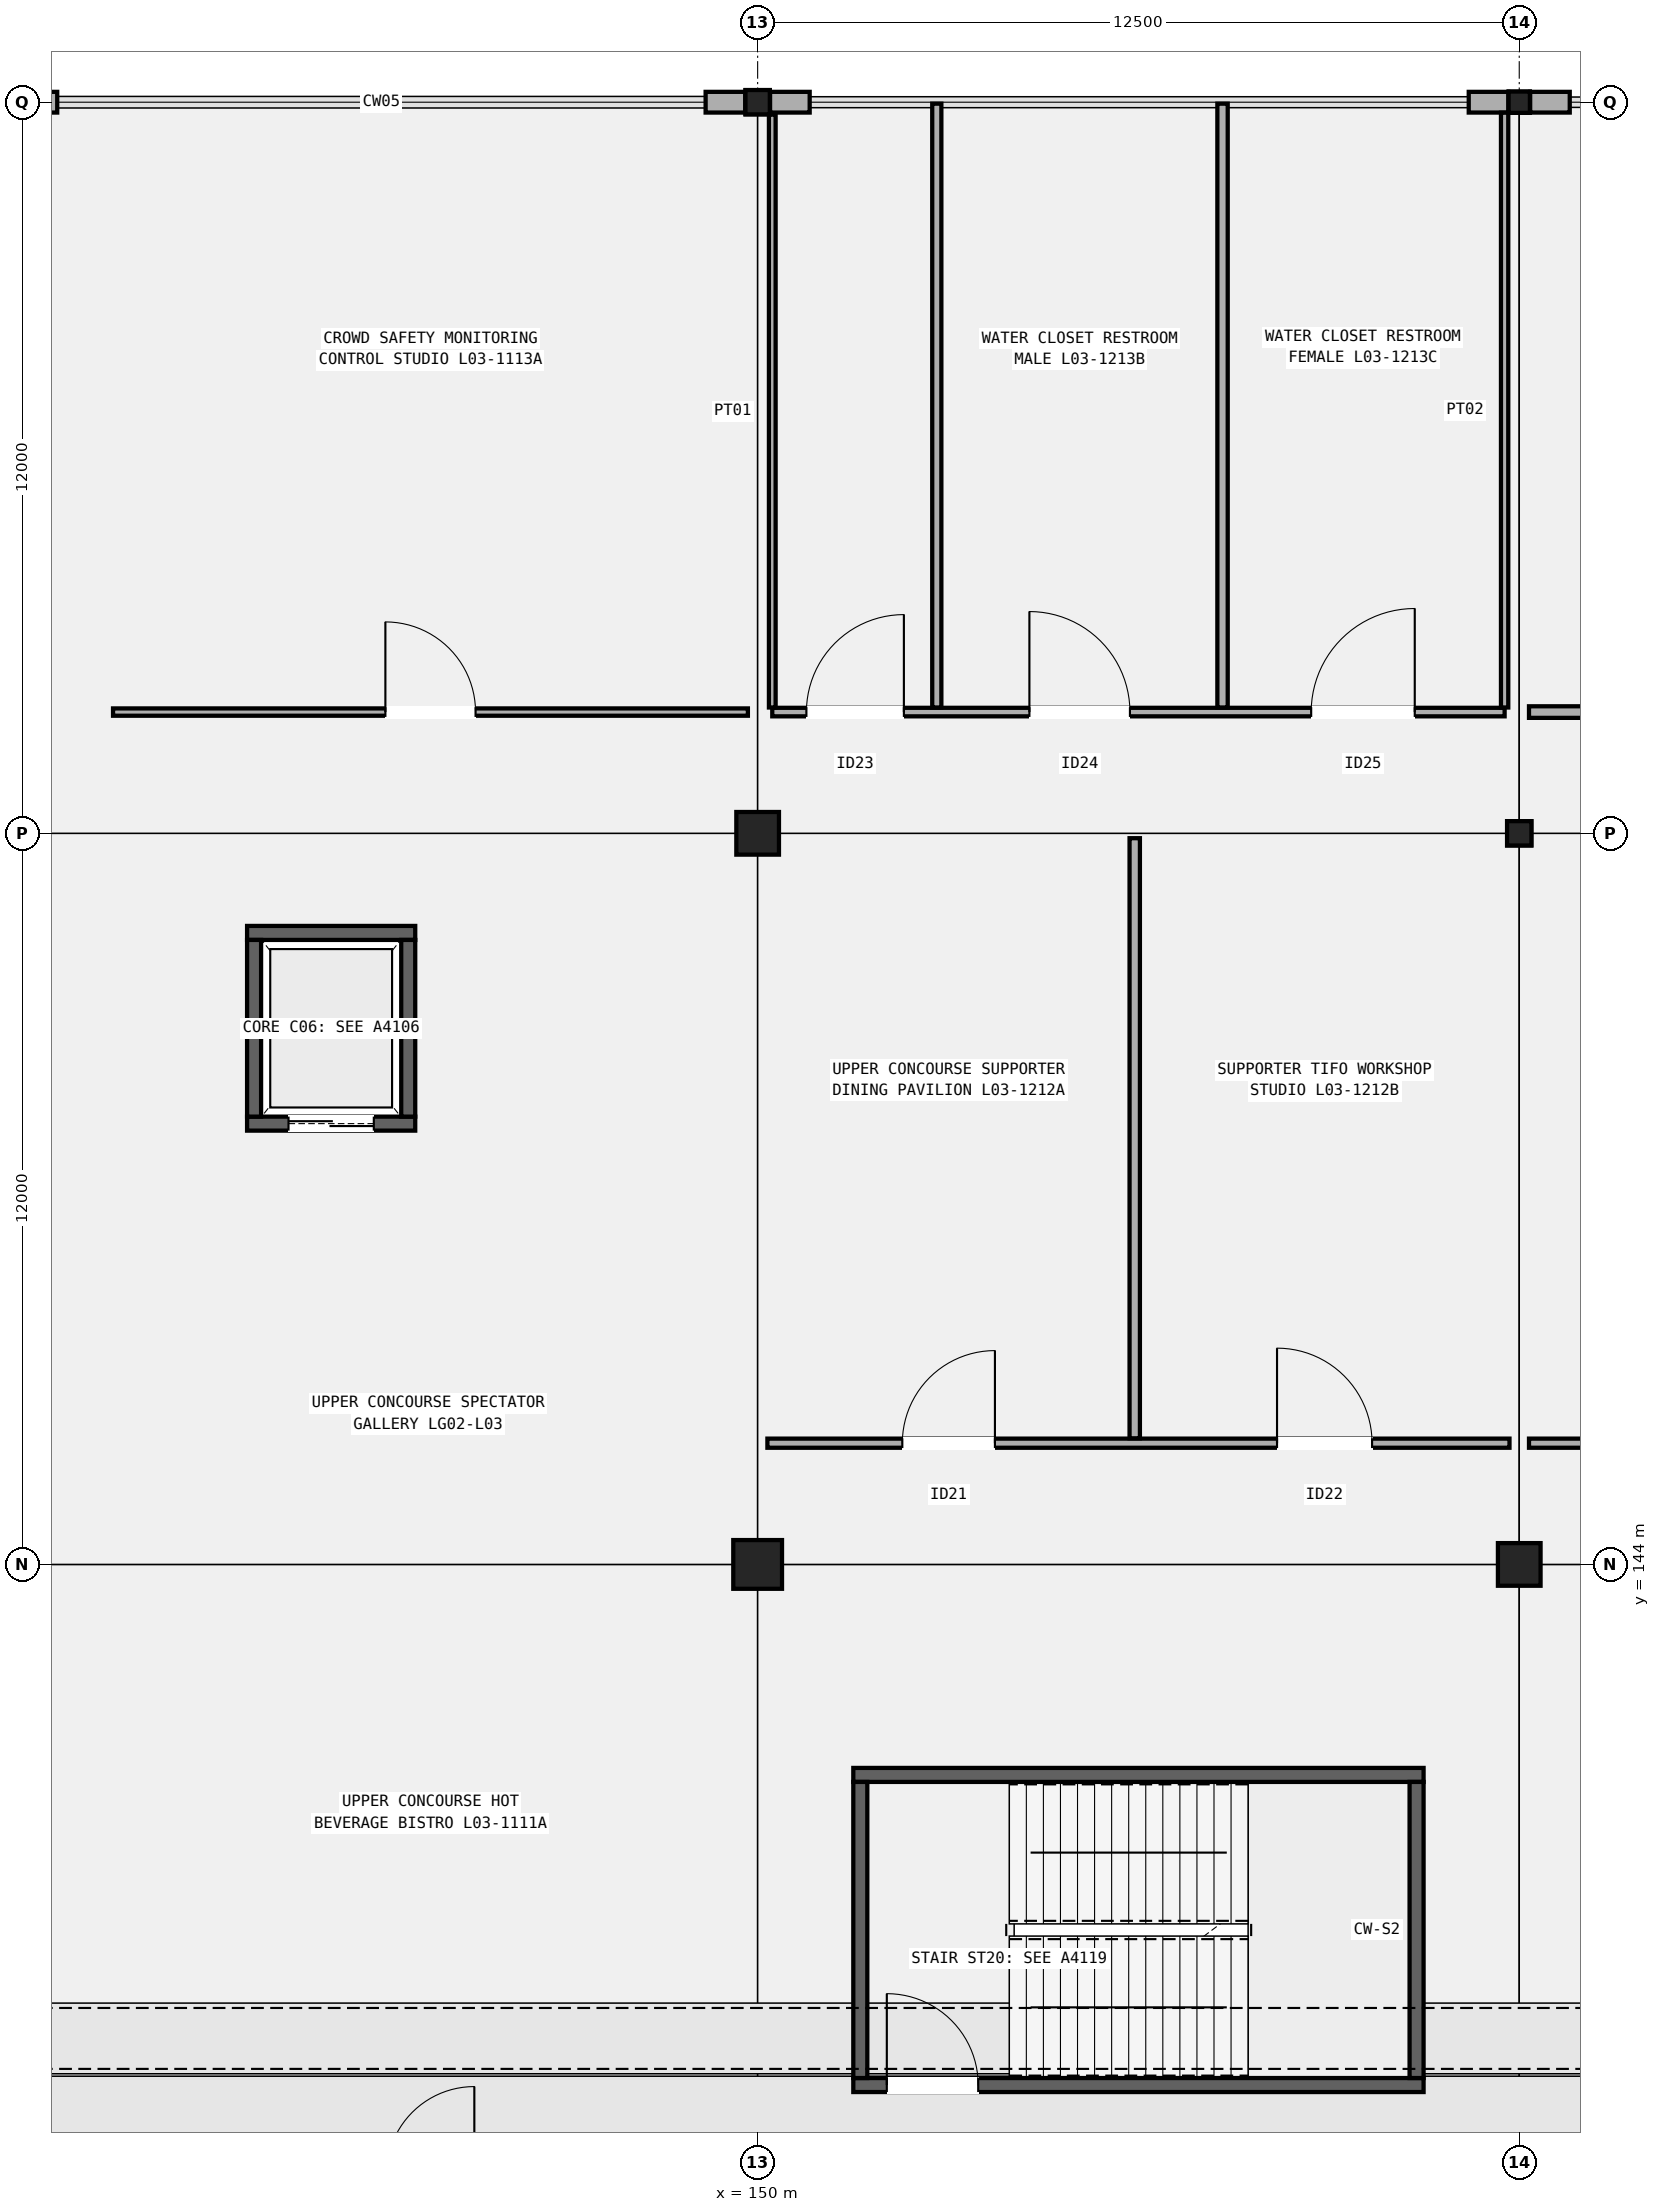
"""IFC4 building model, lengths in metres.
Left out: names, types, materials, properties, quantities, classifications, styles, units other than length and angle.
Written with IfcOpenShell. Run it as: python <this file> out.ifc"""

import sys

from ifc_helpers import new_model, si_unit, direction, frame, frame_2d, origin, origin_2d, place, context, subcontext, project, spatial, rectangle, hollow_rectangle, extrude, element, fill, save


model = new_model("IFC4")
c1 = context("Model", 3, precision=1e-05, world=origin(), true_north=direction((0.0, 1.0)))
c2 = subcontext(c1, "Body", "Model", "MODEL_VIEW")
j1 = project(units=[si_unit("LENGTHUNIT", "METRE"), si_unit("PLANEANGLEUNIT", "RADIAN")], contexts=[c1])
p1 = place(None, origin())
s1 = spatial("IfcSite", under=j1, at=p1, CompositionType="ELEMENT")
p2 = place(p1, origin())
s2 = spatial("IfcBuilding", under=s1, at=p2, CompositionType="ELEMENT")
p3 = place(p2, frame((0.0, 0.0, 15.3)))
s3 = spatial("IfcBuildingStorey", under=s2, at=p3, CompositionType="ELEMENT", Elevation=15.3)
p4 = place(p3, frame((150.0, 144.0, 0.0), z_axis=(0.0, 0.0, 1.0), x_axis=(1.0, 0.0, 0.0)))
e1 = element("IfcColumn", 1, at=p4, inside=s3, PredefinedType="COLUMN", context=c2, shape_type="SweptSolid", body=[
    extrude(rectangle(XDim=0.8, YDim=0.8, at=origin_2d()), origin(), (0.0, 0.0, 1.0), 5.1),
])
p5 = place(p3, frame((150.0, 156.0, 0.0), z_axis=(0.0, 0.0, 1.0), x_axis=(1.0, 0.0, 0.0)))
e2 = element("IfcColumn", 2, at=p5, inside=s3, PredefinedType="COLUMN", context=c2, shape_type="SweptSolid", body=[
    extrude(rectangle(XDim=0.7, YDim=0.7, at=origin_2d()), origin(), (0.0, 0.0, 1.0), 5.1),
])
p6 = place(p3, frame((150.0, 168.0, 0.0), z_axis=(0.0, 0.0, 1.0), x_axis=(1.0, 0.0, 0.0)))
e3 = element("IfcColumn", 3, at=p6, inside=s3, PredefinedType="COLUMN", context=c2, shape_type="SweptSolid", body=[
    extrude(hollow_rectangle(XDim=0.4, YDim=0.4, WallThickness=0.016, InnerFilletRadius=0.016, OuterFilletRadius=0.032, at=origin_2d()), origin(), (0.0, 0.0, 1.0), 5.1),
])
p7 = place(p3, frame((162.5, 144.0, 0.0), z_axis=(0.0, 0.0, 1.0), x_axis=(1.0, 0.0, 0.0)))
e4 = element("IfcColumn", 4, at=p7, inside=s3, PredefinedType="COLUMN", context=c2, shape_type="SweptSolid", body=[
    extrude(rectangle(XDim=0.7, YDim=0.7, at=origin_2d()), origin(), (0.0, 0.0, 1.0), 5.1),
])
p8 = place(p3, frame((162.5, 156.0, 0.0), z_axis=(0.0, 0.0, 1.0), x_axis=(1.0, 0.0, 0.0)))
e5 = element("IfcColumn", 5, at=p8, inside=s3, PredefinedType="COLUMN", context=c2, shape_type="SweptSolid", body=[
    extrude(hollow_rectangle(XDim=0.4, YDim=0.4, WallThickness=0.016, InnerFilletRadius=0.016, OuterFilletRadius=0.032, at=origin_2d()), origin(), (0.0, 0.0, 1.0), 5.1),
])
p9 = place(p3, frame((162.5, 168.0, 0.0), z_axis=(0.0, 0.0, 1.0), x_axis=(1.0, 0.0, 0.0)))
e6 = element("IfcColumn", 6, at=p9, inside=s3, PredefinedType="COLUMN", context=c2, shape_type="SweptSolid", body=[
    extrude(hollow_rectangle(XDim=0.35, YDim=0.35, WallThickness=0.016, InnerFilletRadius=0.016, OuterFilletRadius=0.032, at=origin_2d()), origin(), (0.0, 0.0, 1.0), 5.1),
])
for number, where, z_axis, x_axis in (
    (7, (137.854, 168.0, 0.0), (0.0, 0.0, 1.0), (1.0, 0.0, 0.0)),
    (8, (149.146, 168.0, 0.0), (0.0, 0.0, 1.0), (1.0, 0.0, 0.0)),
):
    element("IfcWall", number, at=place(p3, frame(where, z_axis=z_axis, x_axis=x_axis)), inside=s3, PredefinedType="SOLIDWALL", context=c2, shape_type="SweptSolid", body=[
        extrude(rectangle(XDim=0.65, YDim=0.34, at=frame_2d((0.325, 0.0))), origin(), (0.0, 0.0, 1.0), 4.16),
    ])
p10 = place(p3, frame((150.204, 168.0, 0.0), z_axis=(0.0, 0.0, 1.0), x_axis=(1.0, 0.0, 0.0)))
e9 = element("IfcWall", 9, at=p10, inside=s3, PredefinedType="SOLIDWALL", context=c2, shape_type="SweptSolid", body=[
    extrude(rectangle(XDim=0.65, YDim=0.34, at=frame_2d((0.325, 0.0))), origin(), (0.0, 0.0, 1.0), 4.172),
])
p11 = place(p3, frame((161.671, 168.0, 0.0), z_axis=(0.0, 0.0, 1.0), x_axis=(1.0, 0.0, 0.0)))
e10 = element("IfcWall", 10, at=p11, inside=s3, PredefinedType="SOLIDWALL", context=c2, shape_type="SweptSolid", body=[
    extrude(rectangle(XDim=0.65, YDim=0.34, at=frame_2d((0.325, 0.0))), origin(), (0.0, 0.0, 1.0), 4.172),
])
p12 = place(p3, frame((162.679, 168.0, 0.0), z_axis=(0.0, 0.0, 1.0), x_axis=(1.0, 0.0, 0.0)))
e11 = element("IfcWall", 11, at=p12, inside=s3, PredefinedType="SOLIDWALL", context=c2, shape_type="SweptSolid", body=[
    extrude(rectangle(XDim=0.65, YDim=0.34, at=frame_2d((0.325, 0.0))), origin(), (0.0, 0.0, 1.0), 4.06),
])
p13 = place(p3, frame((151.57, 135.455, 0.0), z_axis=(0.0, 0.0, 1.0), x_axis=(1.0, 0.0, 0.0)))
e12 = element("IfcWall", 12, at=p13, inside=s3, PredefinedType="SHEAR", context=c2, shape_type="SweptSolid", body=[
    extrude(rectangle(XDim=9.36, YDim=0.23, at=frame_2d((4.68, 0.0))), origin(), (0.0, 0.0, 1.0), 4.86),
])
p14 = place(p13, frame((0.55, 0.0, 0.0)))
e13 = element("IfcOpeningElement", 13, at=p14, cuts=e12, PredefinedType="OPENING", context=c2, shape_type="SweptSolid", body=[
    extrude(rectangle(XDim=1.5, YDim=2.2, at=frame_2d((0.75, 1.1))), frame((0.0, 0.125, 0.0), z_axis=(0.0, -1.0, 0.0), x_axis=(1.0, 0.0, 0.0)), (0.0, 0.0, 1.0), 0.25),
])
p15 = place(p3, frame((151.57, 140.545, 0.0), z_axis=(0.0, 0.0, 1.0), x_axis=(1.0, 0.0, 0.0)))
e14 = element("IfcWall", 14, at=p15, inside=s3, PredefinedType="SHEAR", context=c2, shape_type="SweptSolid", body=[
    extrude(rectangle(XDim=9.36, YDim=0.23, at=frame_2d((4.68, 0.0))), origin(), (0.0, 0.0, 1.0), 4.86),
])
for number, where, z_axis, x_axis in (
    (15, (151.685, 135.57, 0.0), (0.0, 0.0, 1.0), (0.0, 1.0, 0.0)),
    (16, (160.815, 135.57, 0.0), (0.0, 0.0, 1.0), (0.0, 1.0, 0.0)),
):
    element("IfcWall", number, at=place(p3, frame(where, z_axis=z_axis, x_axis=x_axis)), inside=s3, PredefinedType="SHEAR", context=c2, shape_type="SweptSolid", body=[
        extrude(rectangle(XDim=4.86, YDim=0.23, at=frame_2d((2.43, 0.0))), origin(), (0.0, 0.0, 1.0), 4.86),
    ])
p16 = place(p3, frame((141.62, 151.235, 0.0), z_axis=(0.0, 0.0, 1.0), x_axis=(1.0, 0.0, 0.0)))
e17 = element("IfcWall", 17, at=p16, inside=s3, PredefinedType="SHEAR", context=c2, shape_type="SweptSolid", body=[
    extrude(rectangle(XDim=2.76, YDim=0.23, at=frame_2d((1.38, 0.0))), origin(), (0.0, 0.0, 1.0), 4.86),
])
p17 = place(p16, frame((0.68, 0.0, 0.0)))
e18 = element("IfcOpeningElement", 18, at=p17, cuts=e17, PredefinedType="OPENING", context=c2, shape_type="SweptSolid", body=[
    extrude(rectangle(XDim=1.4, YDim=2.25, at=frame_2d((0.7, 1.125))), frame((0.0, 0.125, 0.0), z_axis=(0.0, -1.0, 0.0), x_axis=(1.0, 0.0, 0.0)), (0.0, 0.0, 1.0), 0.25),
])
p18 = place(p3, frame((141.62, 154.365, 0.0), z_axis=(0.0, 0.0, 1.0), x_axis=(1.0, 0.0, 0.0)))
e19 = element("IfcWall", 19, at=p18, inside=s3, PredefinedType="SHEAR", context=c2, shape_type="SweptSolid", body=[
    extrude(rectangle(XDim=2.76, YDim=0.23, at=frame_2d((1.38, 0.0))), origin(), (0.0, 0.0, 1.0), 4.86),
])
for number, where, z_axis, x_axis in (
    (20, (141.735, 151.35, 0.0), (0.0, 0.0, 1.0), (0.0, 1.0, 0.0)),
    (21, (144.265, 151.35, 0.0), (0.0, 0.0, 1.0), (0.0, 1.0, 0.0)),
):
    element("IfcWall", number, at=place(p3, frame(where, z_axis=z_axis, x_axis=x_axis)), inside=s3, PredefinedType="SHEAR", context=c2, shape_type="SweptSolid", body=[
        extrude(rectangle(XDim=2.9, YDim=0.23, at=frame_2d((1.45, 0.0))), origin(), (0.0, 0.0, 1.0), 4.86),
    ])
p19 = place(p3, frame((139.42, 157.99, 0.0), z_axis=(0.0, 0.0, 1.0), x_axis=(1.0, 0.0, 0.0)))
e22 = element("IfcWall", 22, at=p19, inside=s3, PredefinedType="PARTITIONING", context=c2, shape_type="SweptSolid", body=[
    extrude(rectangle(XDim=10.42, YDim=0.12, at=frame_2d((5.21, 0.0))), origin(), (0.0, 0.0, 1.0), 4.22),
])
p20 = place(p19, frame((4.47, 0.0, 0.0)))
e23 = element("IfcOpeningElement", 23, at=p20, cuts=e22, PredefinedType="OPENING", context=c2, shape_type="SweptSolid", body=[
    extrude(rectangle(XDim=1.48, YDim=2.24, at=frame_2d((0.74, 1.12))), frame((0.0, 0.07, 0.0), z_axis=(0.0, -1.0, 0.0), x_axis=(1.0, 0.0, 0.0)), (0.0, 0.0, 1.0), 0.14),
])
p21 = place(p3, frame((150.16, 145.99, 0.0), z_axis=(0.0, 0.0, 1.0), x_axis=(1.0, 0.0, 0.0)))
e24 = element("IfcWall", 24, at=p21, inside=s3, PredefinedType="PARTITIONING", context=c2, shape_type="SweptSolid", body=[
    extrude(rectangle(XDim=12.18, YDim=0.15, at=frame_2d((6.09, 0.0))), origin(), (0.0, 0.0, 1.0), 4.22),
])
p22 = place(p21, frame((2.215, 0.0, 0.0)))
e25 = element("IfcOpeningElement", 25, at=p22, cuts=e24, PredefinedType="OPENING", context=c2, shape_type="SweptSolid", body=[
    extrude(rectangle(XDim=1.52, YDim=2.28, at=frame_2d((0.76, 1.14))), frame((0.0, 0.085, 0.0), z_axis=(0.0, -1.0, 0.0), x_axis=(1.0, 0.0, 0.0)), (0.0, 0.0, 1.0), 0.17),
])
p23 = place(p21, frame((8.365, 0.0, 0.0)))
e26 = element("IfcOpeningElement", 26, at=p23, cuts=e24, PredefinedType="OPENING", context=c2, shape_type="SweptSolid", body=[
    extrude(rectangle(XDim=1.56, YDim=2.26, at=frame_2d((0.78, 1.13))), frame((0.0, 0.085, 0.0), z_axis=(0.0, -1.0, 0.0), x_axis=(1.0, 0.0, 0.0)), (0.0, 0.0, 1.0), 0.17),
])
p24 = place(p3, frame((156.189, 146.07, 0.0), z_axis=(0.0, 0.0, 1.0), x_axis=(0.0, 1.0, 0.0)))
e27 = element("IfcWall", 27, at=p24, inside=s3, PredefinedType="PARTITIONING", context=c2, shape_type="SweptSolid", body=[
    extrude(rectangle(XDim=9.85, YDim=0.17, at=frame_2d((4.925, 0.0))), origin(), (0.0, 0.0, 1.0), 4.22),
])
p25 = place(p3, frame((150.24, 157.99, 0.0), z_axis=(0.0, 0.0, 1.0), x_axis=(1.0, 0.0, 0.0)))
e28 = element("IfcWall", 28, at=p25, inside=s3, PredefinedType="PARTITIONING", context=c2, shape_type="SweptSolid", body=[
    extrude(rectangle(XDim=12.02, YDim=0.14, at=frame_2d((6.01, 0.0))), origin(), (0.0, 0.0, 1.0), 4.22),
])
p26 = place(p25, frame((0.56, 0.0, 0.0)))
e29 = element("IfcOpeningElement", 29, at=p26, cuts=e28, PredefinedType="OPENING", context=c2, shape_type="SweptSolid", body=[
    extrude(rectangle(XDim=1.6, YDim=2.3, at=frame_2d((0.8, 1.15))), frame((0.0, 0.08, 0.0), z_axis=(0.0, -1.0, 0.0), x_axis=(1.0, 0.0, 0.0)), (0.0, 0.0, 1.0), 0.16),
])
p27 = place(p25, frame((4.22, 0.0, 0.0)))
e30 = element("IfcOpeningElement", 30, at=p27, cuts=e28, PredefinedType="OPENING", context=c2, shape_type="SweptSolid", body=[
    extrude(rectangle(XDim=1.65, YDim=2.28, at=frame_2d((0.825, 1.14))), frame((0.0, 0.08, 0.0), z_axis=(0.0, -1.0, 0.0), x_axis=(1.0, 0.0, 0.0)), (0.0, 0.0, 1.0), 0.16),
])
p28 = place(p25, frame((8.845, 0.0, 0.0)))
e31 = element("IfcOpeningElement", 31, at=p28, cuts=e28, PredefinedType="OPENING", context=c2, shape_type="SweptSolid", body=[
    extrude(rectangle(XDim=1.7, YDim=2.32, at=frame_2d((0.85, 1.16))), frame((0.0, 0.08, 0.0), z_axis=(0.0, -1.0, 0.0), x_axis=(1.0, 0.0, 0.0)), (0.0, 0.0, 1.0), 0.16),
])
p29 = place(p3, frame((150.24, 158.065, 0.0), z_axis=(0.0, 0.0, 1.0), x_axis=(0.0, 1.0, 0.0)))
e32 = element("IfcWall", 32, at=p29, inside=s3, PredefinedType="PARTITIONING", context=c2, shape_type="SweptSolid", body=[
    extrude(rectangle(XDim=9.731, YDim=0.11, at=frame_2d((4.865, 0.0))), origin(), (0.0, 0.0, 1.0), 4.22),
])
p30 = place(p3, frame((162.26, 158.065, 0.0), z_axis=(0.0, 0.0, 1.0), x_axis=(0.0, 1.0, 0.0)))
e33 = element("IfcWall", 33, at=p30, inside=s3, PredefinedType="PARTITIONING", context=c2, shape_type="SweptSolid", body=[
    extrude(rectangle(XDim=9.763, YDim=0.12, at=frame_2d((4.881, 0.0))), origin(), (0.0, 0.0, 1.0), 4.132),
])
p31 = place(p3, frame((152.94, 158.065, 0.0), z_axis=(0.0, 0.0, 1.0), x_axis=(0.0, 1.0, 0.0)))
e34 = element("IfcWall", 34, at=p31, inside=s3, PredefinedType="PARTITIONING", context=c2, shape_type="SweptSolid", body=[
    extrude(rectangle(XDim=9.911, YDim=0.15, at=frame_2d((4.956, 0.0))), origin(), (0.0, 0.0, 1.0), 4.22),
])
p32 = place(p3, frame((157.63, 158.065, 0.0), z_axis=(0.0, 0.0, 1.0), x_axis=(0.0, 1.0, 0.0)))
e35 = element("IfcWall", 35, at=p32, inside=s3, PredefinedType="PARTITIONING", context=c2, shape_type="SweptSolid", body=[
    extrude(rectangle(XDim=9.911, YDim=0.17, at=frame_2d((4.956, 0.0))), origin(), (0.0, 0.0, 1.0), 4.22),
])
p33 = place(p3, frame((162.66, 145.99, 0.0), z_axis=(0.0, 0.0, 1.0), x_axis=(1.0, 0.0, 0.0)))
e36 = element("IfcWall", 36, at=p33, inside=s3, PredefinedType="PARTITIONING", context=c2, shape_type="SweptSolid", body=[
    extrude(rectangle(XDim=12.18, YDim=0.15, at=frame_2d((6.09, 0.0))), origin(), (0.0, 0.0, 1.0), 4.22),
])
p34 = place(p33, frame((5.615, 0.0, 0.0)))
e37 = element("IfcOpeningElement", 37, at=p34, cuts=e36, PredefinedType="OPENING", context=c2, shape_type="SweptSolid", body=[
    extrude(rectangle(XDim=0.95, YDim=2.12, at=frame_2d((0.475, 1.06))), frame((0.0, 0.085, 0.0), z_axis=(0.0, -1.0, 0.0), x_axis=(1.0, 0.0, 0.0)), (0.0, 0.0, 1.0), 0.17),
])
p35 = place(p3, frame((162.66, 157.99, 0.0), z_axis=(0.0, 0.0, 1.0), x_axis=(1.0, 0.0, 0.0)))
e38 = element("IfcWall", 38, at=p35, inside=s3, PredefinedType="PARTITIONING", context=c2, shape_type="SweptSolid", body=[
    extrude(rectangle(XDim=12.198, YDim=0.19, at=frame_2d((6.099, 0.0))), origin(), (0.0, 0.0, 1.0), 4.22),
])
p36 = place(p35, frame((5.6, 0.0, 0.0)))
e39 = element("IfcOpeningElement", 39, at=p36, cuts=e38, PredefinedType="OPENING", context=c2, shape_type="SweptSolid", body=[
    extrude(rectangle(XDim=0.98, YDim=2.1, at=frame_2d((0.49, 1.05))), frame((0.0, 0.105, 0.0), z_axis=(0.0, -1.0, 0.0), x_axis=(1.0, 0.0, 0.0)), (0.0, 0.0, 1.0), 0.21),
])
p37 = place(p14, origin())
e40 = element("IfcDoor", 40, at=p37, inside=s3, OperationType="SINGLE_SWING_LEFT", PredefinedType="DOOR", context=c2, shape_type="SweptSolid", body=[
    extrude(rectangle(XDim=1.5, YDim=2.2, at=frame_2d((0.75, 1.1))), frame((0.0, 0.025, 0.0), z_axis=(0.0, -1.0, 0.0), x_axis=(1.0, 0.0, 0.0)), (0.0, 0.0, 1.0), 0.05),
])
fill(e13, e40)
p38 = place(p17, origin())
e41 = element("IfcDoor", 41, at=p38, inside=s3, OperationType="DOUBLE_DOOR_SLIDING", PredefinedType="DOOR", context=c2, shape_type="SweptSolid", body=[
    extrude(rectangle(XDim=1.4, YDim=2.25, at=frame_2d((0.7, 1.125))), frame((0.0, 0.025, 0.0), z_axis=(0.0, -1.0, 0.0), x_axis=(1.0, 0.0, 0.0)), (0.0, 0.0, 1.0), 0.05),
])
fill(e18, e41)
p39 = place(p20, origin())
e42 = element("IfcDoor", 42, at=p39, inside=s3, OperationType="SINGLE_SWING_LEFT", PredefinedType="DOOR", context=c2, shape_type="SweptSolid", body=[
    extrude(rectangle(XDim=1.48, YDim=2.24, at=frame_2d((0.74, 1.12))), frame((0.0, 0.025, 0.0), z_axis=(0.0, -1.0, 0.0), x_axis=(1.0, 0.0, 0.0)), (0.0, 0.0, 1.0), 0.05),
])
fill(e23, e42)
p40 = place(p22, origin())
e43 = element("IfcDoor", 43, at=p40, inside=s3, OperationType="SINGLE_SWING_RIGHT", PredefinedType="DOOR", context=c2, shape_type="SweptSolid", body=[
    extrude(rectangle(XDim=1.52, YDim=2.28, at=frame_2d((0.76, 1.14))), frame((0.0, 0.025, 0.0), z_axis=(0.0, -1.0, 0.0), x_axis=(1.0, 0.0, 0.0)), (0.0, 0.0, 1.0), 0.05),
])
fill(e25, e43)
p41 = place(p23, origin())
e44 = element("IfcDoor", 44, at=p41, inside=s3, OperationType="SINGLE_SWING_LEFT", PredefinedType="DOOR", context=c2, shape_type="SweptSolid", body=[
    extrude(rectangle(XDim=1.56, YDim=2.26, at=frame_2d((0.78, 1.13))), frame((0.0, 0.025, 0.0), z_axis=(0.0, -1.0, 0.0), x_axis=(1.0, 0.0, 0.0)), (0.0, 0.0, 1.0), 0.05),
])
fill(e26, e44)
p42 = place(p26, origin())
e45 = element("IfcDoor", 45, at=p42, inside=s3, OperationType="SINGLE_SWING_RIGHT", PredefinedType="DOOR", context=c2, shape_type="SweptSolid", body=[
    extrude(rectangle(XDim=1.6, YDim=2.3, at=frame_2d((0.8, 1.15))), frame((0.0, 0.025, 0.0), z_axis=(0.0, -1.0, 0.0), x_axis=(1.0, 0.0, 0.0)), (0.0, 0.0, 1.0), 0.05),
])
fill(e29, e45)
p43 = place(p27, origin())
e46 = element("IfcDoor", 46, at=p43, inside=s3, OperationType="SINGLE_SWING_LEFT", PredefinedType="DOOR", context=c2, shape_type="SweptSolid", body=[
    extrude(rectangle(XDim=1.65, YDim=2.28, at=frame_2d((0.825, 1.14))), frame((0.0, 0.025, 0.0), z_axis=(0.0, -1.0, 0.0), x_axis=(1.0, 0.0, 0.0)), (0.0, 0.0, 1.0), 0.05),
])
fill(e30, e46)
p44 = place(p28, origin())
e47 = element("IfcDoor", 47, at=p44, inside=s3, OperationType="SINGLE_SWING_RIGHT", PredefinedType="DOOR", context=c2, shape_type="SweptSolid", body=[
    extrude(rectangle(XDim=1.7, YDim=2.32, at=frame_2d((0.85, 1.16))), frame((0.0, 0.025, 0.0), z_axis=(0.0, -1.0, 0.0), x_axis=(1.0, 0.0, 0.0)), (0.0, 0.0, 1.0), 0.05),
])
fill(e31, e47)
save(model, sys.argv[1])
